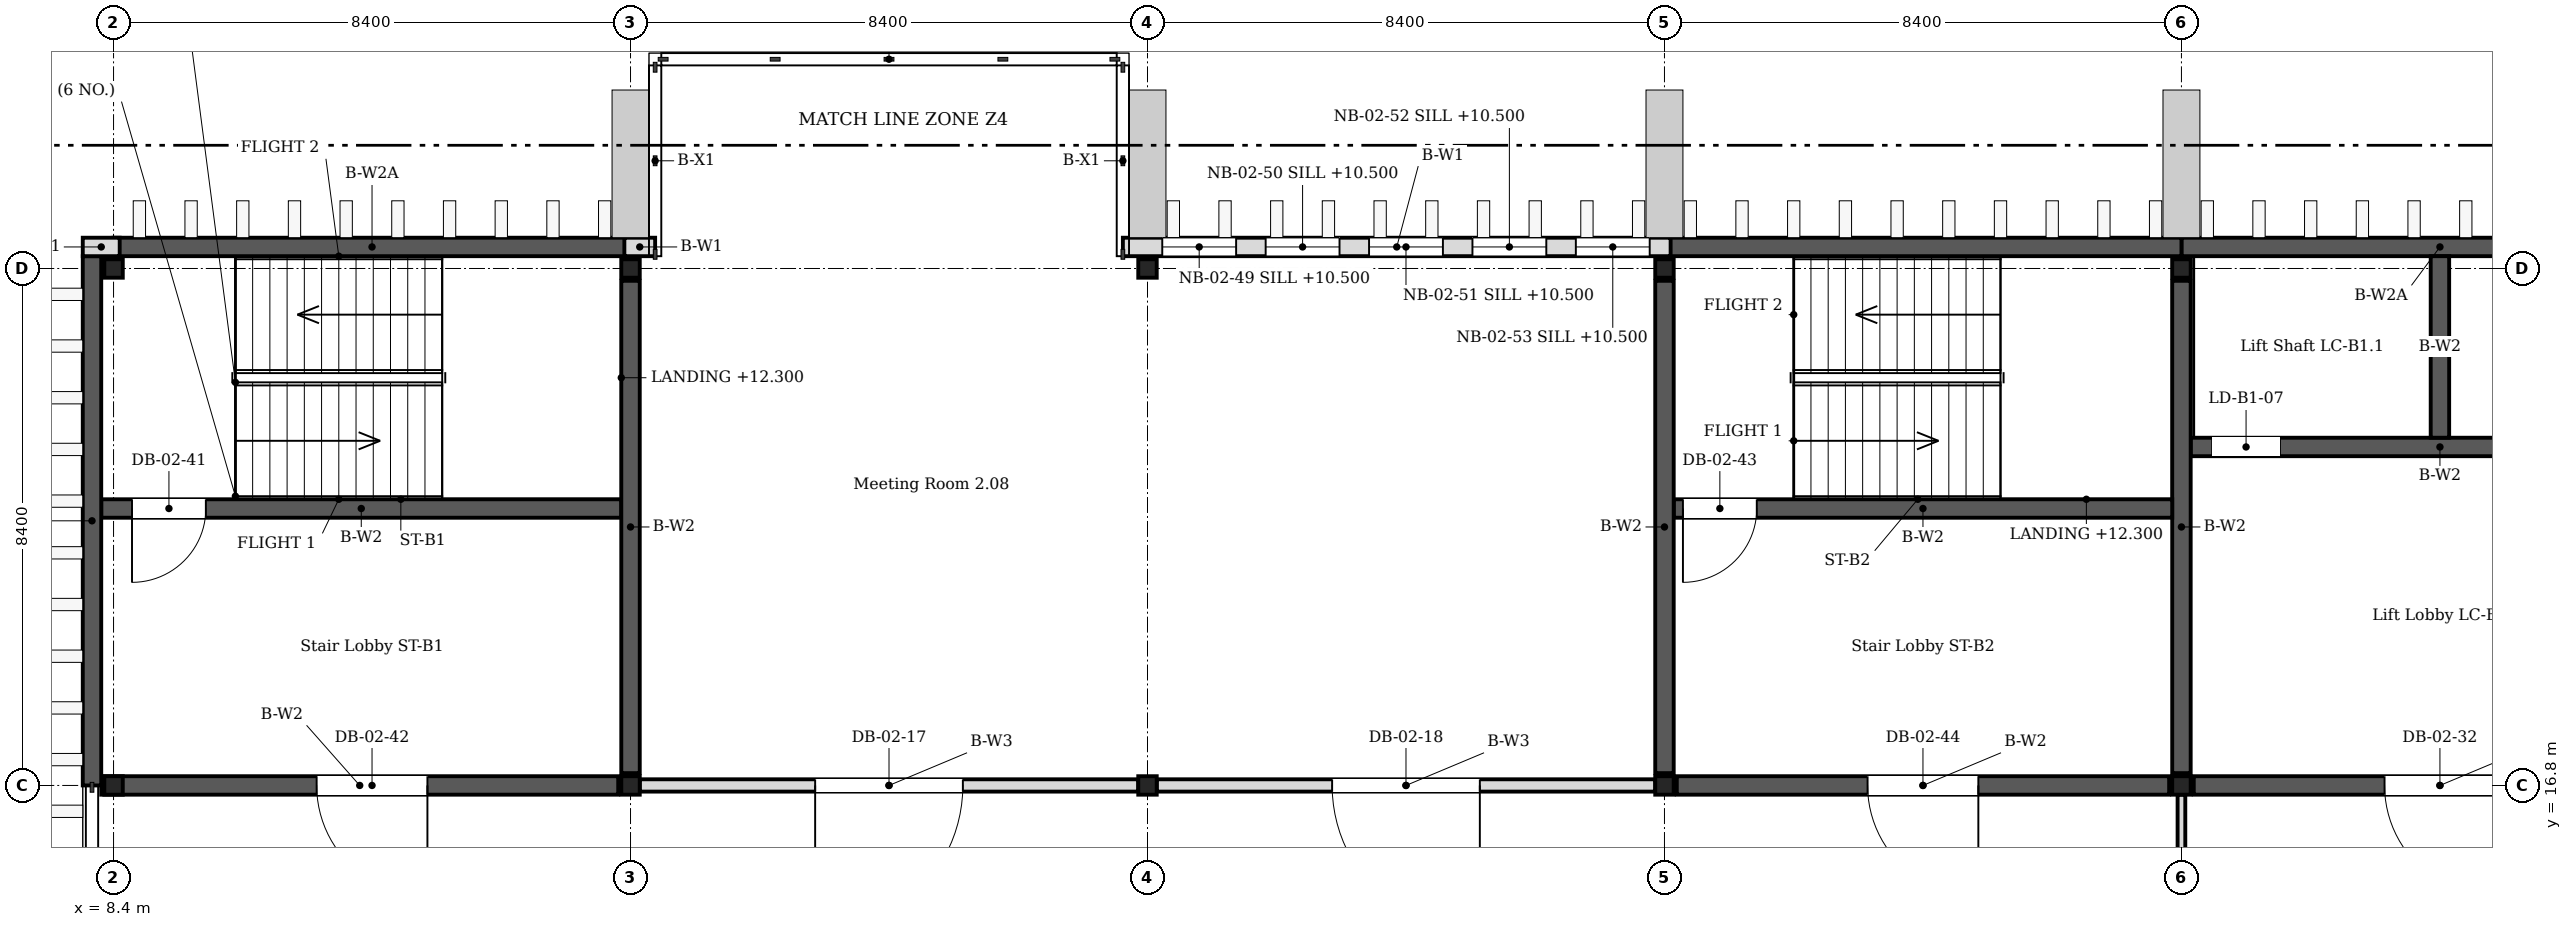
"""IFC4 building model, lengths in metres.
Left out: names, types, materials, properties, quantities, classifications, styles, units other than length and angle.
Written with IfcOpenShell. Run it as: python <this file> out.ifc"""

import sys

from ifc_helpers import new_model, si_unit, direction, frame, frame_2d, origin, origin_2d, place, context, subcontext, project, spatial, rectangle, i_section, extrude, element, fill, save


model = new_model("IFC4")
c1 = context("Model", 3, precision=1e-05, world=origin(), true_north=direction((0.0, 1.0)))
c2 = subcontext(c1, "Body", "Model", "MODEL_VIEW")
j1 = project(units=[si_unit("LENGTHUNIT", "METRE"), si_unit("PLANEANGLEUNIT", "RADIAN")], contexts=[c1])
p1 = place(None, origin())
s1 = spatial("IfcSite", under=j1, at=p1, CompositionType="ELEMENT")
p2 = place(p1, origin())
s2 = spatial("IfcBuilding", under=s1, at=p2, CompositionType="ELEMENT")
p3 = place(p2, frame((0.0, 0.0, 10.2)))
s3 = spatial("IfcBuildingStorey", under=s2, at=p3, CompositionType="ELEMENT", Elevation=10.2)
for number, where, z_axis, x_axis in (
    (1, (8.4, 16.8, 0.0), (0.0, 0.0, 1.0), (1.0, 0.0, 0.0)),
    (2, (8.4, 25.2, 0.0), (0.0, 0.0, 1.0), (1.0, 0.0, 0.0)),
    (3, (16.8, 16.8, 0.0), (0.0, 0.0, 1.0), (1.0, 0.0, 0.0)),
    (4, (16.8, 25.2, 0.0), (0.0, 0.0, 1.0), (1.0, 0.0, 0.0)),
    (5, (25.2, 16.8, 0.0), (0.0, 0.0, 1.0), (1.0, 0.0, 0.0)),
    (6, (25.2, 25.2, 0.0), (0.0, 0.0, 1.0), (1.0, 0.0, 0.0)),
    (7, (33.6, 16.8, 0.0), (0.0, 0.0, 1.0), (1.0, 0.0, 0.0)),
    (8, (33.6, 25.2, 0.0), (0.0, 0.0, 1.0), (1.0, 0.0, 0.0)),
    (9, (42.0, 16.8, 0.0), (0.0, 0.0, 1.0), (1.0, 0.0, 0.0)),
    (10, (42.0, 25.2, 0.0), (0.0, 0.0, 1.0), (1.0, 0.0, 0.0)),
):
    element("IfcColumn", number, at=place(p3, frame(where, z_axis=z_axis, x_axis=x_axis)), inside=s3, PredefinedType="COLUMN", context=c2, shape_type="SweptSolid", body=[
        extrude(i_section(OverallWidth=0.3, OverallDepth=0.3, WebThickness=0.01, FlangeThickness=0.015, FilletRadius=0.013, at=origin_2d()), origin(), (0.0, 0.0, 1.0), 4.2),
    ])
p4 = place(p3, frame((42.0, 17.0, 0.0), z_axis=(0.0, 0.0, 1.0), x_axis=(0.0, 1.0, 0.0)))
e11 = element("IfcWall", 11, at=p4, inside=s3, PredefinedType="SHEAR", context=c2, shape_type="SweptSolid", body=[
    extrude(rectangle(XDim=8.0, YDim=0.3, at=frame_2d((4.0, 0.0))), origin(), (0.0, 0.0, 1.0), 4.05),
])
p5 = place(p3, frame((42.2, 16.8, 0.0), z_axis=(0.0, 0.0, 1.0), x_axis=(1.0, 0.0, 0.0)))
e12 = element("IfcWall", 12, at=p5, inside=s3, PredefinedType="SHEAR", context=c2, shape_type="SweptSolid", body=[
    extrude(rectangle(XDim=8.0, YDim=0.3, at=frame_2d((4.0, 0.0))), origin(), (0.0, 0.0, 1.0), 4.05),
])
p6 = place(p5, frame((3.1, 0.0, 0.0)))
e13 = element("IfcOpeningElement", 13, at=p6, cuts=e12, PredefinedType="OPENING", context=c2, shape_type="SweptSolid", body=[
    extrude(rectangle(XDim=1.8, YDim=2.1, at=frame_2d((0.9, 1.05))), frame((0.0, 0.16, 0.0), z_axis=(0.0, -1.0, 0.0), x_axis=(1.0, 0.0, 0.0)), (0.0, 0.0, 1.0), 0.32),
])
p7 = place(p3, frame((42.15, 22.3, 0.0), z_axis=(0.0, 0.0, 1.0), x_axis=(1.0, 0.0, 0.0)))
e14 = element("IfcWall", 14, at=p7, inside=s3, PredefinedType="SHEAR", context=c2, shape_type="SweptSolid", body=[
    extrude(rectangle(XDim=8.1, YDim=0.3, at=frame_2d((4.05, 0.0))), origin(), (0.0, 0.0, 1.0), 4.05),
])
p8 = place(p7, frame((0.35, 0.0, 0.0)))
e15 = element("IfcOpeningElement", 15, at=p8, cuts=e14, PredefinedType="OPENING", context=c2, shape_type="SweptSolid", body=[
    extrude(rectangle(XDim=1.1, YDim=2.2, at=frame_2d((0.55, 1.1))), frame((0.0, 0.16, 0.0), z_axis=(0.0, -1.0, 0.0), x_axis=(1.0, 0.0, 0.0)), (0.0, 0.0, 1.0), 0.32),
])
p9 = place(p7, frame((6.65, 0.0, 0.0)))
e16 = element("IfcOpeningElement", 16, at=p9, cuts=e14, PredefinedType="OPENING", context=c2, shape_type="SweptSolid", body=[
    extrude(rectangle(XDim=1.1, YDim=2.2, at=frame_2d((0.55, 1.1))), frame((0.0, 0.16, 0.0), z_axis=(0.0, -1.0, 0.0), x_axis=(1.0, 0.0, 0.0)), (0.0, 0.0, 1.0), 0.32),
])
p10 = place(p3, frame((42.0, 25.55, 0.0), z_axis=(0.0, 0.0, 1.0), x_axis=(1.0, 0.0, 0.0)))
e17 = element("IfcWall", 17, at=p10, inside=s3, PredefinedType="SHEAR", context=c2, shape_type="SweptSolid", body=[
    extrude(rectangle(XDim=8.4, YDim=0.3, at=frame_2d((4.2, 0.0))), origin(), (0.0, 0.0, 1.0), 4.05),
])
p11 = place(p3, frame((46.2, 22.45, 0.0), z_axis=(0.0, 0.0, 1.0), x_axis=(0.0, 1.0, 0.0)))
e18 = element("IfcWall", 18, at=p11, inside=s3, PredefinedType="SHEAR", context=c2, shape_type="SweptSolid", body=[
    extrude(rectangle(XDim=2.95, YDim=0.3, at=frame_2d((1.475, 0.0))), origin(), (0.0, 0.0, 1.0), 4.05),
])
p12 = place(p3, frame((8.05, 16.8, 0.0), z_axis=(0.0, 0.0, 1.0), x_axis=(0.0, 1.0, 0.0)))
e19 = element("IfcWall", 19, at=p12, inside=s3, PredefinedType="SHEAR", context=c2, shape_type="SweptSolid", body=[
    extrude(rectangle(XDim=8.6, YDim=0.3, at=frame_2d((4.3, 0.0))), origin(), (0.0, 0.0, 1.0), 4.05),
])
p13 = place(p3, frame((16.8, 17.0, 0.0), z_axis=(0.0, 0.0, 1.0), x_axis=(0.0, 1.0, 0.0)))
e20 = element("IfcWall", 20, at=p13, inside=s3, PredefinedType="SHEAR", context=c2, shape_type="SweptSolid", body=[
    extrude(rectangle(XDim=8.0, YDim=0.3, at=frame_2d((4.0, 0.0))), origin(), (0.0, 0.0, 1.0), 4.05),
])
p14 = place(p3, frame((8.2, 16.8, 0.0), z_axis=(0.0, 0.0, 1.0), x_axis=(1.0, 0.0, 0.0)))
e21 = element("IfcWall", 21, at=p14, inside=s3, PredefinedType="SHEAR", context=c2, shape_type="SweptSolid", body=[
    extrude(rectangle(XDim=8.4, YDim=0.3, at=frame_2d((4.2, 0.0))), origin(), (0.0, 0.0, 1.0), 4.05),
])
p15 = place(p14, frame((3.5, 0.0, 0.0)))
e22 = element("IfcOpeningElement", 22, at=p15, cuts=e21, PredefinedType="OPENING", context=c2, shape_type="SweptSolid", body=[
    extrude(rectangle(XDim=1.8, YDim=2.1, at=frame_2d((0.9, 1.05))), frame((0.0, 0.16, 0.0), z_axis=(0.0, -1.0, 0.0), x_axis=(1.0, 0.0, 0.0)), (0.0, 0.0, 1.0), 0.32),
])
p16 = place(p3, frame((8.2, 21.3, 0.0), z_axis=(0.0, 0.0, 1.0), x_axis=(1.0, 0.0, 0.0)))
e23 = element("IfcWall", 23, at=p16, inside=s3, PredefinedType="SHEAR", context=c2, shape_type="SweptSolid", body=[
    extrude(rectangle(XDim=8.45, YDim=0.3, at=frame_2d((4.225, 0.0))), origin(), (0.0, 0.0, 1.0), 4.05),
])
p17 = place(p16, frame((0.5, 0.0, 0.0)))
e24 = element("IfcOpeningElement", 24, at=p17, cuts=e23, PredefinedType="OPENING", context=c2, shape_type="SweptSolid", body=[
    extrude(rectangle(XDim=1.2, YDim=2.1, at=frame_2d((0.6, 1.05))), frame((0.0, 0.16, 0.0), z_axis=(0.0, -1.0, 0.0), x_axis=(1.0, 0.0, 0.0)), (0.0, 0.0, 1.0), 0.32),
])
p18 = place(p3, frame((8.4, 25.55, 0.0), z_axis=(0.0, 0.0, 1.0), x_axis=(1.0, 0.0, 0.0)))
e25 = element("IfcWall", 25, at=p18, inside=s3, PredefinedType="SHEAR", context=c2, shape_type="SweptSolid", body=[
    extrude(rectangle(XDim=8.4, YDim=0.3, at=frame_2d((4.2, 0.0))), origin(), (0.0, 0.0, 1.0), 4.05),
])
p19 = place(p3, frame((33.6, 17.0, 0.0), z_axis=(0.0, 0.0, 1.0), x_axis=(0.0, 1.0, 0.0)))
e26 = element("IfcWall", 26, at=p19, inside=s3, PredefinedType="SHEAR", context=c2, shape_type="SweptSolid", body=[
    extrude(rectangle(XDim=8.0, YDim=0.3, at=frame_2d((4.0, 0.0))), origin(), (0.0, 0.0, 1.0), 4.05),
])
p20 = place(p3, frame((33.8, 16.8, 0.0), z_axis=(0.0, 0.0, 1.0), x_axis=(1.0, 0.0, 0.0)))
e27 = element("IfcWall", 27, at=p20, inside=s3, PredefinedType="SHEAR", context=c2, shape_type="SweptSolid", body=[
    extrude(rectangle(XDim=8.0, YDim=0.3, at=frame_2d((4.0, 0.0))), origin(), (0.0, 0.0, 1.0), 4.05),
])
p21 = place(p20, frame((3.1, 0.0, 0.0)))
e28 = element("IfcOpeningElement", 28, at=p21, cuts=e27, PredefinedType="OPENING", context=c2, shape_type="SweptSolid", body=[
    extrude(rectangle(XDim=1.8, YDim=2.1, at=frame_2d((0.9, 1.05))), frame((0.0, 0.16, 0.0), z_axis=(0.0, -1.0, 0.0), x_axis=(1.0, 0.0, 0.0)), (0.0, 0.0, 1.0), 0.32),
])
p22 = place(p3, frame((33.75, 21.3, 0.0), z_axis=(0.0, 0.0, 1.0), x_axis=(1.0, 0.0, 0.0)))
e29 = element("IfcWall", 29, at=p22, inside=s3, PredefinedType="SHEAR", context=c2, shape_type="SweptSolid", body=[
    extrude(rectangle(XDim=8.1, YDim=0.3, at=frame_2d((4.05, 0.0))), origin(), (0.0, 0.0, 1.0), 4.05),
])
p23 = place(p22, frame((0.15, 0.0, 0.0)))
e30 = element("IfcOpeningElement", 30, at=p23, cuts=e29, PredefinedType="OPENING", context=c2, shape_type="SweptSolid", body=[
    extrude(rectangle(XDim=1.2, YDim=2.1, at=frame_2d((0.6, 1.05))), frame((0.0, 0.16, 0.0), z_axis=(0.0, -1.0, 0.0), x_axis=(1.0, 0.0, 0.0)), (0.0, 0.0, 1.0), 0.32),
])
p24 = place(p3, frame((33.6, 25.55, 0.0), z_axis=(0.0, 0.0, 1.0), x_axis=(1.0, 0.0, 0.0)))
e31 = element("IfcWall", 31, at=p24, inside=s3, PredefinedType="SHEAR", context=c2, shape_type="SweptSolid", body=[
    extrude(rectangle(XDim=8.4, YDim=0.3, at=frame_2d((4.2, 0.0))), origin(), (0.0, 0.0, 1.0), 4.05),
])
p25 = place(p3, frame((7.9, 25.55, 0.0), z_axis=(0.0, 0.0, 1.0), x_axis=(1.0, 0.0, 0.0)))
e32 = element("IfcWall", 32, at=p25, inside=s3, PredefinedType="SOLIDWALL", context=c2, shape_type="SweptSolid", body=[
    extrude(rectangle(XDim=0.6, YDim=0.3, at=frame_2d((0.3, 0.0))), origin(), (0.0, 0.0, 1.0), 4.05),
])
p26 = place(p3, frame((16.7, 25.55, 0.0), z_axis=(0.0, 0.0, 1.0), x_axis=(1.0, 0.0, 0.0)))
e33 = element("IfcWall", 33, at=p26, inside=s3, PredefinedType="SOLIDWALL", context=c2, shape_type="SweptSolid", body=[
    extrude(rectangle(XDim=0.5, YDim=0.3, at=frame_2d((0.25, 0.0))), origin(), (0.0, 0.0, 1.0), 4.05),
])
p27 = place(p3, frame((24.8, 25.55, 0.0), z_axis=(0.0, 0.0, 1.0), x_axis=(1.0, 0.0, 0.0)))
e34 = element("IfcWall", 34, at=p27, inside=s3, PredefinedType="SOLIDWALL", context=c2, shape_type="SweptSolid", body=[
    extrude(rectangle(XDim=8.9, YDim=0.3, at=frame_2d((4.45, 0.0))), origin(), (0.0, 0.0, 1.0), 4.05),
])
p28 = place(p27, frame((0.64, 0.0, 0.3)))
e35 = element("IfcOpeningElement", 35, at=p28, cuts=e34, PredefinedType="OPENING", context=c2, shape_type="SweptSolid", body=[
    extrude(rectangle(XDim=1.2, YDim=3.3, at=frame_2d((0.6, 1.65))), frame((0.0, 0.16, 0.0), z_axis=(0.0, -1.0, 0.0), x_axis=(1.0, 0.0, 0.0)), (0.0, 0.0, 1.0), 0.32),
])
p29 = place(p27, frame((2.32, 0.0, 0.3)))
e36 = element("IfcOpeningElement", 36, at=p29, cuts=e34, PredefinedType="OPENING", context=c2, shape_type="SweptSolid", body=[
    extrude(rectangle(XDim=1.2, YDim=3.3, at=frame_2d((0.6, 1.65))), frame((0.0, 0.16, 0.0), z_axis=(0.0, -1.0, 0.0), x_axis=(1.0, 0.0, 0.0)), (0.0, 0.0, 1.0), 0.32),
])
p30 = place(p27, frame((4.0, 0.0, 0.3)))
e37 = element("IfcOpeningElement", 37, at=p30, cuts=e34, PredefinedType="OPENING", context=c2, shape_type="SweptSolid", body=[
    extrude(rectangle(XDim=1.2, YDim=3.3, at=frame_2d((0.6, 1.65))), frame((0.0, 0.16, 0.0), z_axis=(0.0, -1.0, 0.0), x_axis=(1.0, 0.0, 0.0)), (0.0, 0.0, 1.0), 0.32),
])
p31 = place(p27, frame((5.68, 0.0, 0.3)))
e38 = element("IfcOpeningElement", 38, at=p31, cuts=e34, PredefinedType="OPENING", context=c2, shape_type="SweptSolid", body=[
    extrude(rectangle(XDim=1.2, YDim=3.3, at=frame_2d((0.6, 1.65))), frame((0.0, 0.16, 0.0), z_axis=(0.0, -1.0, 0.0), x_axis=(1.0, 0.0, 0.0)), (0.0, 0.0, 1.0), 0.32),
])
p32 = place(p27, frame((7.36, 0.0, 0.3)))
e39 = element("IfcOpeningElement", 39, at=p32, cuts=e34, PredefinedType="OPENING", context=c2, shape_type="SweptSolid", body=[
    extrude(rectangle(XDim=1.2, YDim=3.3, at=frame_2d((0.6, 1.65))), frame((0.0, 0.16, 0.0), z_axis=(0.0, -1.0, 0.0), x_axis=(1.0, 0.0, 0.0)), (0.0, 0.0, 1.0), 0.32),
])
p33 = place(p3, frame((16.95, 16.8, 0.0), z_axis=(0.0, 0.0, 1.0), x_axis=(1.0, 0.0, 0.0)))
e40 = element("IfcWall", 40, at=p33, inside=s3, PredefinedType="PARTITIONING", context=c2, shape_type="SweptSolid", body=[
    extrude(rectangle(XDim=8.1, YDim=0.2, at=frame_2d((4.05, 0.0))), origin(), (0.0, 0.0, 1.0), 3.35),
])
p34 = place(p33, frame((2.85, 0.0, 0.0)))
e41 = element("IfcOpeningElement", 41, at=p34, cuts=e40, PredefinedType="OPENING", context=c2, shape_type="SweptSolid", body=[
    extrude(rectangle(XDim=2.4, YDim=2.2, at=frame_2d((1.2, 1.1))), frame((0.0, 0.11, 0.0), z_axis=(0.0, -1.0, 0.0), x_axis=(1.0, 0.0, 0.0)), (0.0, 0.0, 1.0), 0.22),
])
p35 = place(p3, frame((25.35, 16.8, 0.0), z_axis=(0.0, 0.0, 1.0), x_axis=(1.0, 0.0, 0.0)))
e42 = element("IfcWall", 42, at=p35, inside=s3, PredefinedType="PARTITIONING", context=c2, shape_type="SweptSolid", body=[
    extrude(rectangle(XDim=8.1, YDim=0.2, at=frame_2d((4.05, 0.0))), origin(), (0.0, 0.0, 1.0), 3.35),
])
p36 = place(p35, frame((2.85, 0.0, 0.0)))
e43 = element("IfcOpeningElement", 43, at=p36, cuts=e42, PredefinedType="OPENING", context=c2, shape_type="SweptSolid", body=[
    extrude(rectangle(XDim=2.4, YDim=2.2, at=frame_2d((1.2, 1.1))), frame((0.0, 0.11, 0.0), z_axis=(0.0, -1.0, 0.0), x_axis=(1.0, 0.0, 0.0)), (0.0, 0.0, 1.0), 0.22),
])
p37 = place(p3, frame((42.0, 8.55, 0.0), z_axis=(0.0, 0.0, 1.0), x_axis=(0.0, 1.0, 0.0)))
e44 = element("IfcWall", 44, at=p37, inside=s3, PredefinedType="PARTITIONING", context=c2, shape_type="SweptSolid", body=[
    extrude(rectangle(XDim=8.1, YDim=0.125, at=frame_2d((4.05, 0.0))), origin(), (0.0, 0.0, 1.0), 3.35),
])
p38 = place(p37, frame((2.85, 0.0, 0.0)))
e45 = element("IfcOpeningElement", 45, at=p38, cuts=e44, PredefinedType="OPENING", context=c2, shape_type="SweptSolid", body=[
    extrude(rectangle(XDim=2.4, YDim=2.2, at=frame_2d((1.2, 1.1))), frame((0.0, 0.073, 0.0), z_axis=(0.0, -1.0, 0.0), x_axis=(1.0, 0.0, 0.0)), (0.0, 0.0, 1.0), 0.145),
])
p39 = place(p28, origin())
e46 = element("IfcWindow", 46, at=p39, inside=s3, PartitioningType="TRIPLE_PANEL_VERTICAL", PredefinedType="WINDOW", context=c2, shape_type="SweptSolid", body=[
    extrude(rectangle(XDim=1.2, YDim=3.3, at=frame_2d((0.6, 1.65))), frame((0.0, 0.03, 0.0), z_axis=(0.0, -1.0, 0.0), x_axis=(1.0, 0.0, 0.0)), (0.0, 0.0, 1.0), 0.06),
])
fill(e35, e46)
p40 = place(p29, origin())
e47 = element("IfcWindow", 47, at=p40, inside=s3, PartitioningType="TRIPLE_PANEL_VERTICAL", PredefinedType="WINDOW", context=c2, shape_type="SweptSolid", body=[
    extrude(rectangle(XDim=1.2, YDim=3.3, at=frame_2d((0.6, 1.65))), frame((0.0, 0.03, 0.0), z_axis=(0.0, -1.0, 0.0), x_axis=(1.0, 0.0, 0.0)), (0.0, 0.0, 1.0), 0.06),
])
fill(e36, e47)
p41 = place(p30, origin())
e48 = element("IfcWindow", 48, at=p41, inside=s3, PartitioningType="TRIPLE_PANEL_VERTICAL", PredefinedType="WINDOW", context=c2, shape_type="SweptSolid", body=[
    extrude(rectangle(XDim=1.2, YDim=3.3, at=frame_2d((0.6, 1.65))), frame((0.0, 0.03, 0.0), z_axis=(0.0, -1.0, 0.0), x_axis=(1.0, 0.0, 0.0)), (0.0, 0.0, 1.0), 0.06),
])
fill(e37, e48)
p42 = place(p31, origin())
e49 = element("IfcWindow", 49, at=p42, inside=s3, PartitioningType="TRIPLE_PANEL_VERTICAL", PredefinedType="WINDOW", context=c2, shape_type="SweptSolid", body=[
    extrude(rectangle(XDim=1.2, YDim=3.3, at=frame_2d((0.6, 1.65))), frame((0.0, 0.03, 0.0), z_axis=(0.0, -1.0, 0.0), x_axis=(1.0, 0.0, 0.0)), (0.0, 0.0, 1.0), 0.06),
])
fill(e38, e49)
p43 = place(p32, origin())
e50 = element("IfcWindow", 50, at=p43, inside=s3, PartitioningType="TRIPLE_PANEL_VERTICAL", PredefinedType="WINDOW", context=c2, shape_type="SweptSolid", body=[
    extrude(rectangle(XDim=1.2, YDim=3.3, at=frame_2d((0.6, 1.65))), frame((0.0, 0.03, 0.0), z_axis=(0.0, -1.0, 0.0), x_axis=(1.0, 0.0, 0.0)), (0.0, 0.0, 1.0), 0.06),
])
fill(e39, e50)
p44 = place(p34, origin())
e51 = element("IfcDoor", 51, at=p44, inside=s3, OperationType="DOUBLE_DOOR_SINGLE_SWING", PredefinedType="DOOR", context=c2, shape_type="SweptSolid", body=[
    extrude(rectangle(XDim=2.4, YDim=2.2, at=frame_2d((1.2, 1.1))), frame((0.0, 0.025, 0.0), z_axis=(0.0, -1.0, 0.0), x_axis=(1.0, 0.0, 0.0)), (0.0, 0.0, 1.0), 0.05),
])
fill(e41, e51)
p45 = place(p36, origin())
e52 = element("IfcDoor", 52, at=p45, inside=s3, OperationType="DOUBLE_DOOR_SINGLE_SWING", PredefinedType="DOOR", context=c2, shape_type="SweptSolid", body=[
    extrude(rectangle(XDim=2.4, YDim=2.2, at=frame_2d((1.2, 1.1))), frame((0.0, 0.025, 0.0), z_axis=(0.0, -1.0, 0.0), x_axis=(1.0, 0.0, 0.0)), (0.0, 0.0, 1.0), 0.05),
])
fill(e43, e52)
p46 = place(p6, origin())
e53 = element("IfcDoor", 53, at=p46, inside=s3, OperationType="DOUBLE_DOOR_SINGLE_SWING", PredefinedType="DOOR", context=c2, shape_type="SweptSolid", body=[
    extrude(rectangle(XDim=1.8, YDim=2.1, at=frame_2d((0.9, 1.05))), frame((0.0, 0.025, 0.0), z_axis=(0.0, -1.0, 0.0), x_axis=(1.0, 0.0, 0.0)), (0.0, 0.0, 1.0), 0.05),
])
fill(e13, e53)
p47 = place(p8, origin())
e54 = element("IfcDoor", 54, at=p47, inside=s3, OperationType="SLIDING_TO_LEFT", PredefinedType="DOOR", context=c2, shape_type="SweptSolid", body=[
    extrude(rectangle(XDim=1.1, YDim=2.2, at=frame_2d((0.55, 1.1))), frame((0.0, 0.025, 0.0), z_axis=(0.0, -1.0, 0.0), x_axis=(1.0, 0.0, 0.0)), (0.0, 0.0, 1.0), 0.05),
])
fill(e15, e54)
p48 = place(p17, origin())
e55 = element("IfcDoor", 55, at=p48, inside=s3, OperationType="SINGLE_SWING_LEFT", PredefinedType="DOOR", context=c2, shape_type="SweptSolid", body=[
    extrude(rectangle(XDim=1.2, YDim=2.1, at=frame_2d((0.6, 1.05))), frame((0.0, 0.025, 0.0), z_axis=(0.0, -1.0, 0.0), x_axis=(1.0, 0.0, 0.0)), (0.0, 0.0, 1.0), 0.05),
])
fill(e24, e55)
p49 = place(p15, origin())
e56 = element("IfcDoor", 56, at=p49, inside=s3, OperationType="DOUBLE_DOOR_SINGLE_SWING", PredefinedType="DOOR", context=c2, shape_type="SweptSolid", body=[
    extrude(rectangle(XDim=1.8, YDim=2.1, at=frame_2d((0.9, 1.05))), frame((0.0, 0.025, 0.0), z_axis=(0.0, -1.0, 0.0), x_axis=(1.0, 0.0, 0.0)), (0.0, 0.0, 1.0), 0.05),
])
fill(e22, e56)
p50 = place(p23, origin())
e57 = element("IfcDoor", 57, at=p50, inside=s3, OperationType="SINGLE_SWING_LEFT", PredefinedType="DOOR", context=c2, shape_type="SweptSolid", body=[
    extrude(rectangle(XDim=1.2, YDim=2.1, at=frame_2d((0.6, 1.05))), frame((0.0, 0.025, 0.0), z_axis=(0.0, -1.0, 0.0), x_axis=(1.0, 0.0, 0.0)), (0.0, 0.0, 1.0), 0.05),
])
fill(e30, e57)
p51 = place(p21, origin())
e58 = element("IfcDoor", 58, at=p51, inside=s3, OperationType="DOUBLE_DOOR_SINGLE_SWING", PredefinedType="DOOR", context=c2, shape_type="SweptSolid", body=[
    extrude(rectangle(XDim=1.8, YDim=2.1, at=frame_2d((0.9, 1.05))), frame((0.0, 0.025, 0.0), z_axis=(0.0, -1.0, 0.0), x_axis=(1.0, 0.0, 0.0)), (0.0, 0.0, 1.0), 0.05),
])
fill(e28, e58)
save(model, sys.argv[1])
